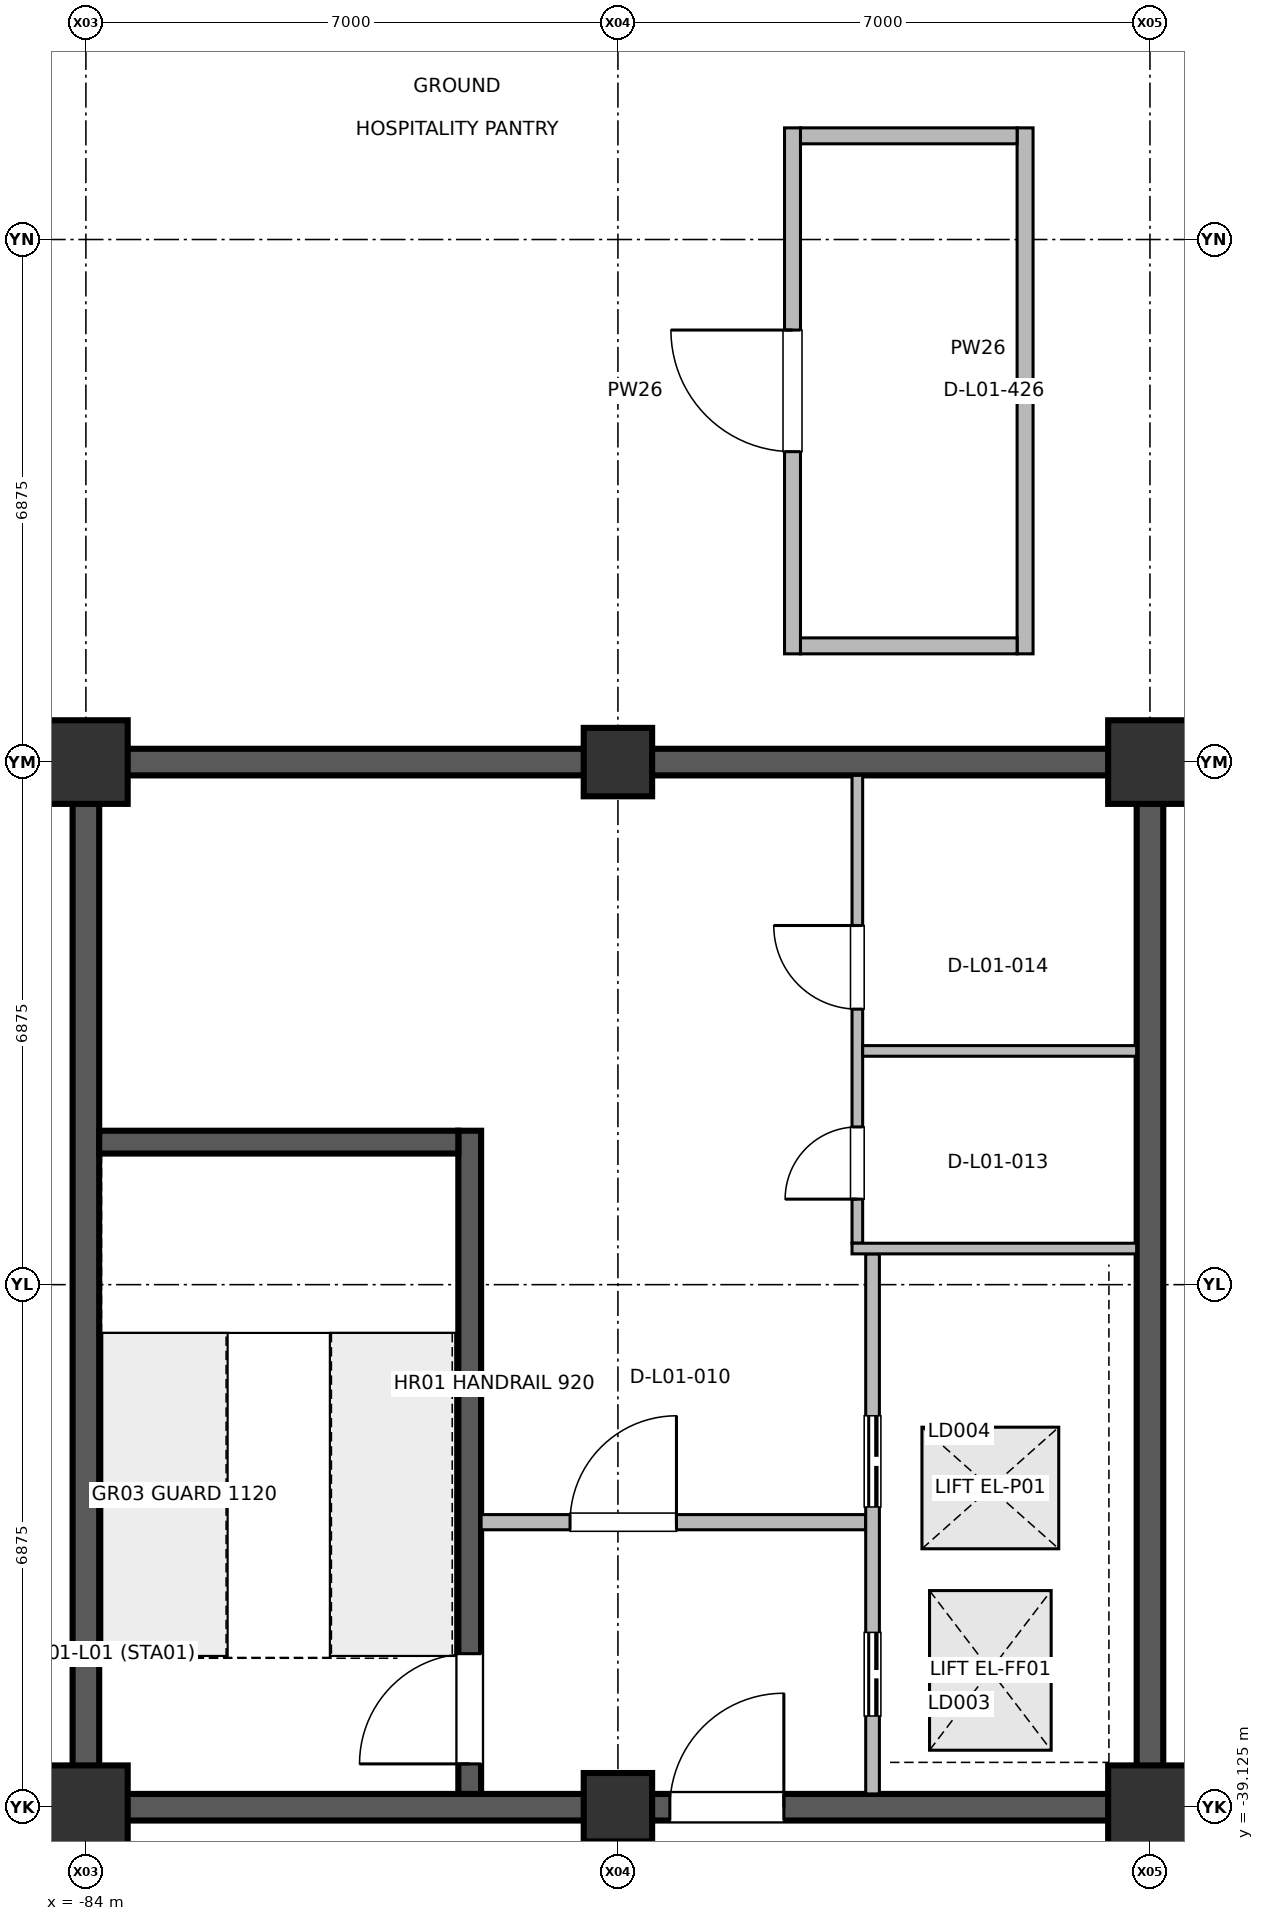
"""IFC4 building model, lengths in metres.
Left out: names, types, materials, properties, quantities, classifications, styles, units other than length and angle.
Written with IfcOpenShell. Run it as: python <this file> out.ifc"""

import sys

from ifc_helpers import new_model, si_unit, direction, frame, frame_2d, origin, origin_2d, place, context, subcontext, project, spatial, rectangle, extrude, element, fill, save


model = new_model("IFC4")
c1 = context("Model", 3, precision=1e-05, world=origin(), true_north=direction((0.0, 1.0)))
c2 = subcontext(c1, "Body", "Model", "MODEL_VIEW")
j1 = project(units=[si_unit("LENGTHUNIT", "METRE"), si_unit("PLANEANGLEUNIT", "RADIAN")], contexts=[c1])
p1 = place(None, origin())
s1 = spatial("IfcSite", under=j1, at=p1, CompositionType="ELEMENT")
p2 = place(p1, origin())
s2 = spatial("IfcBuilding", under=s1, at=p2, CompositionType="ELEMENT")
p3 = place(p2, origin())
s3 = spatial("IfcBuildingStorey", under=s2, at=p3, CompositionType="ELEMENT", Elevation=0.0)
for number, where, z_axis, x_axis in (
    (1, (-84.0, -39.125, 0.0), (0.0, 0.0, 1.0), (1.0, 0.0, 0.0)),
    (2, (-84.0, -25.375, 0.0), (0.0, 0.0, 1.0), (1.0, 0.0, 0.0)),
):
    element("IfcColumn", number, at=place(p3, frame(where, z_axis=z_axis, x_axis=x_axis)), inside=s3, PredefinedType="COLUMN", context=c2, shape_type="SweptSolid", body=[
        extrude(rectangle(XDim=1.1, YDim=1.1, at=origin_2d()), origin(), (0.0, 0.0, 1.0), 5.998),
    ])
for number, where, z_axis, x_axis in (
    (3, (-77.0, -39.125, 0.0), (0.0, 0.0, 1.0), (1.0, 0.0, 0.0)),
    (4, (-77.0, -25.375, 0.0), (0.0, 0.0, 1.0), (1.0, 0.0, 0.0)),
):
    element("IfcColumn", number, at=place(p3, frame(where, z_axis=z_axis, x_axis=x_axis)), inside=s3, PredefinedType="COLUMN", context=c2, shape_type="SweptSolid", body=[
        extrude(rectangle(XDim=0.9, YDim=0.9, at=origin_2d()), origin(), (0.0, 0.0, 1.0), 5.998),
    ])
for number, where, z_axis, x_axis in (
    (5, (-70.0, -39.125, 0.0), (0.0, 0.0, 1.0), (1.0, 0.0, 0.0)),
    (6, (-70.0, -25.375, 0.0), (0.0, 0.0, 1.0), (1.0, 0.0, 0.0)),
):
    element("IfcColumn", number, at=place(p3, frame(where, z_axis=z_axis, x_axis=x_axis)), inside=s3, PredefinedType="COLUMN", context=c2, shape_type="SweptSolid", body=[
        extrude(rectangle(XDim=1.1, YDim=1.1, at=origin_2d()), origin(), (0.0, 0.0, 1.0), 5.998),
    ])
for number, where, z_axis, x_axis in (
    (7, (-84.0, -38.95, 0.0), (0.0, 0.0, 1.0), (0.0, 1.0, 0.0)),
    (8, (-70.0, -38.95, 0.0), (0.0, 0.0, 1.0), (0.0, 1.0, 0.0)),
):
    element("IfcWall", number, at=place(p3, frame(where, z_axis=z_axis, x_axis=x_axis)), inside=s3, PredefinedType="SHEAR", context=c2, shape_type="SweptSolid", body=[
        extrude(rectangle(XDim=13.4, YDim=0.35, at=frame_2d((6.7, 0.0))), origin(), (0.0, 0.0, 1.0), 5.78),
    ])
p4 = place(p3, frame((-83.825, -39.125, 0.0), z_axis=(0.0, 0.0, 1.0), x_axis=(1.0, 0.0, 0.0)))
e9 = element("IfcWall", 9, at=p4, inside=s3, PredefinedType="SHEAR", context=c2, shape_type="SweptSolid", body=[
    extrude(rectangle(XDim=13.65, YDim=0.35, at=frame_2d((6.825, 0.0))), origin(), (0.0, 0.0, 1.0), 5.78),
])
p5 = place(p4, frame((7.508, 0.0, 0.0)))
e10 = element("IfcOpeningElement", 10, at=p5, cuts=e9, PredefinedType="OPENING", context=c2, shape_type="SweptSolid", body=[
    extrude(rectangle(XDim=1.5, YDim=2.2, at=frame_2d((0.75, 1.1))), frame((0.0, 0.185, 0.0), z_axis=(0.0, -1.0, 0.0), x_axis=(1.0, 0.0, 0.0)), (0.0, 0.0, 1.0), 0.37),
])
p6 = place(p3, frame((-83.825, -25.375, 0.0), z_axis=(0.0, 0.0, 1.0), x_axis=(1.0, 0.0, 0.0)))
e11 = element("IfcWall", 11, at=p6, inside=s3, PredefinedType="SHEAR", context=c2, shape_type="SweptSolid", body=[
    extrude(rectangle(XDim=13.65, YDim=0.35, at=frame_2d((6.825, 0.0))), origin(), (0.0, 0.0, 1.0), 5.78),
])
p7 = place(p3, frame((-78.95, -38.95, 0.0), z_axis=(0.0, 0.0, 1.0), x_axis=(0.0, 1.0, 0.0)))
e12 = element("IfcWall", 12, at=p7, inside=s3, PredefinedType="SHEAR", context=c2, shape_type="SweptSolid", body=[
    extrude(rectangle(XDim=8.725, YDim=0.3, at=frame_2d((4.362, 0.0))), origin(), (0.0, 0.0, 1.0), 5.78),
])
p8 = place(p7, frame((0.395, 0.0, 0.0)))
e13 = element("IfcOpeningElement", 13, at=p8, cuts=e12, PredefinedType="OPENING", context=c2, shape_type="SweptSolid", body=[
    extrude(rectangle(XDim=1.45, YDim=2.2, at=frame_2d((0.725, 1.1))), frame((0.0, 0.16, 0.0), z_axis=(0.0, -1.0, 0.0), x_axis=(1.0, 0.0, 0.0)), (0.0, 0.0, 1.0), 0.32),
])
p9 = place(p3, frame((-78.8, -35.375, 0.0), z_axis=(0.0, 0.0, 1.0), x_axis=(1.0, 0.0, 0.0)))
e14 = element("IfcWall", 14, at=p9, inside=s3, PredefinedType="PARTITIONING", context=c2, shape_type="SweptSolid", body=[
    extrude(rectangle(XDim=5.06, YDim=0.2, at=frame_2d((2.53, 0.0))), origin(), (0.0, 0.0, 1.0), 4.905),
])
p10 = place(p9, frame((1.17, 0.0, 0.0)))
e15 = element("IfcOpeningElement", 15, at=p10, cuts=e14, PredefinedType="OPENING", context=c2, shape_type="SweptSolid", body=[
    extrude(rectangle(XDim=1.4, YDim=2.2, at=frame_2d((0.7, 1.1))), frame((0.0, 0.11, 0.0), z_axis=(0.0, -1.0, 0.0), x_axis=(1.0, 0.0, 0.0)), (0.0, 0.0, 1.0), 0.22),
])
p11 = place(p3, frame((-73.65, -38.95, 0.0), z_axis=(0.0, 0.0, 1.0), x_axis=(0.0, 1.0, 0.0)))
e16 = element("IfcWall", 16, at=p11, inside=s3, PredefinedType="PARTITIONING", context=c2, shape_type="SweptSolid", body=[
    extrude(rectangle(XDim=7.105, YDim=0.18, at=frame_2d((3.552, 0.0))), origin(), (0.0, 0.0, 1.0), 5.02),
])
p12 = place(p11, frame((1.025, 0.0, 0.0)))
e17 = element("IfcOpeningElement", 17, at=p12, cuts=e16, PredefinedType="OPENING", context=c2, shape_type="SweptSolid", body=[
    extrude(rectangle(XDim=1.1, YDim=2.2, at=frame_2d((0.55, 1.1))), frame((0.0, 0.1, 0.0), z_axis=(0.0, -1.0, 0.0), x_axis=(1.0, 0.0, 0.0)), (0.0, 0.0, 1.0), 0.2),
])
p13 = place(p11, frame((3.775, 0.0, 0.0)))
e18 = element("IfcOpeningElement", 18, at=p13, cuts=e16, PredefinedType="OPENING", context=c2, shape_type="SweptSolid", body=[
    extrude(rectangle(XDim=1.2, YDim=2.25, at=frame_2d((0.6, 1.125))), frame((0.0, 0.1, 0.0), z_axis=(0.0, -1.0, 0.0), x_axis=(1.0, 0.0, 0.0)), (0.0, 0.0, 1.0), 0.2),
])
p14 = place(p3, frame((-73.85, -31.705, 0.0), z_axis=(0.0, 0.0, 1.0), x_axis=(0.0, 1.0, 0.0)))
e19 = element("IfcWall", 19, at=p14, inside=s3, PredefinedType="PARTITIONING", context=c2, shape_type="SweptSolid", body=[
    extrude(rectangle(XDim=6.155, YDim=0.14, at=frame_2d((3.078, 0.0))), origin(), (0.0, 0.0, 1.0), 5.02),
])
p15 = place(p14, frame((0.58, 0.0, 0.0)))
e20 = element("IfcOpeningElement", 20, at=p15, cuts=e19, PredefinedType="OPENING", context=c2, shape_type="SweptSolid", body=[
    extrude(rectangle(XDim=0.95, YDim=2.15, at=frame_2d((0.475, 1.075))), frame((0.0, 0.08, 0.0), z_axis=(0.0, -1.0, 0.0), x_axis=(1.0, 0.0, 0.0)), (0.0, 0.0, 1.0), 0.16),
])
p16 = place(p14, frame((3.08, 0.0, 0.0)))
e21 = element("IfcOpeningElement", 21, at=p16, cuts=e19, PredefinedType="OPENING", context=c2, shape_type="SweptSolid", body=[
    extrude(rectangle(XDim=1.1, YDim=2.15, at=frame_2d((0.55, 1.075))), frame((0.0, 0.08, 0.0), z_axis=(0.0, -1.0, 0.0), x_axis=(1.0, 0.0, 0.0)), (0.0, 0.0, 1.0), 0.16),
])
p17 = place(p3, frame((-74.703, -23.951, 0.0), z_axis=(0.0, 0.0, 1.0), x_axis=(0.0, 1.0, 0.0)))
e22 = element("IfcWall", 22, at=p17, inside=s3, PredefinedType="PARTITIONING", context=c2, shape_type="SweptSolid", body=[
    extrude(rectangle(XDim=6.92, YDim=0.21, at=frame_2d((3.46, 0.0))), origin(), (0.0, 0.0, 1.0), 5.02),
])
p18 = place(p17, frame((2.66, 0.0, 0.0)))
e23 = element("IfcOpeningElement", 23, at=p18, cuts=e22, PredefinedType="OPENING", context=c2, shape_type="SweptSolid", body=[
    extrude(rectangle(XDim=1.6, YDim=2.25, at=frame_2d((0.8, 1.125))), frame((0.0, 0.115, 0.0), z_axis=(0.0, -1.0, 0.0), x_axis=(1.0, 0.0, 0.0)), (0.0, 0.0, 1.0), 0.23),
])
p19 = place(p3, frame((-73.92, -31.775, 0.0), z_axis=(0.0, 0.0, 1.0), x_axis=(1.0, 0.0, 0.0)))
e24 = element("IfcWall", 24, at=p19, inside=s3, PredefinedType="PARTITIONING", context=c2, shape_type="SweptSolid", body=[
    extrude(rectangle(XDim=3.745, YDim=0.14, at=frame_2d((1.873, 0.0))), origin(), (0.0, 0.0, 1.0), 5.02),
])
p20 = place(p3, frame((-73.78, -29.175, 0.0), z_axis=(0.0, 0.0, 1.0), x_axis=(1.0, 0.0, 0.0)))
e25 = element("IfcWall", 25, at=p20, inside=s3, PredefinedType="PARTITIONING", context=c2, shape_type="SweptSolid", body=[
    extrude(rectangle(XDim=3.605, YDim=0.14, at=frame_2d((1.802, 0.0))), origin(), (0.0, 0.0, 1.0), 5.02),
])
p21 = place(p3, frame((-71.643, -23.951, 0.0), z_axis=(0.0, 0.0, 1.0), x_axis=(0.0, 1.0, 0.0)))
e26 = element("IfcWall", 26, at=p21, inside=s3, PredefinedType="PARTITIONING", context=c2, shape_type="SweptSolid", body=[
    extrude(rectangle(XDim=6.92, YDim=0.21, at=frame_2d((3.46, 0.0))), origin(), (0.0, 0.0, 1.0), 5.02),
])
for number, where, z_axis, x_axis in (
    (27, (-74.598, -23.846, 0.0), (0.0, 0.0, 1.0), (1.0, 0.0, 0.0)),
    (28, (-74.598, -17.136, 0.0), (0.0, 0.0, 1.0), (1.0, 0.0, 0.0)),
):
    element("IfcWall", number, at=place(p3, frame(where, z_axis=z_axis, x_axis=x_axis)), inside=s3, PredefinedType="PARTITIONING", context=c2, shape_type="SweptSolid", body=[
        extrude(rectangle(XDim=2.85, YDim=0.21, at=frame_2d((1.425, 0.0))), origin(), (0.0, 0.0, 1.0), 5.02),
    ])
p22 = place(p3, frame((-83.825, -30.375, 0.0), z_axis=(0.0, 0.0, 1.0), x_axis=(1.0, 0.0, 0.0)))
e29 = element("IfcWall", 29, at=p22, inside=s3, PredefinedType="SHEAR", context=c2, shape_type="SweptSolid", body=[
    extrude(rectangle(XDim=4.725, YDim=0.3, at=frame_2d((2.362, 0.0))), origin(), (0.0, 0.0, 1.0), 5.78),
])
p23 = place(p5, origin())
e30 = element("IfcDoor", 30, at=p23, inside=s3, OperationType="SINGLE_SWING_RIGHT", PredefinedType="DOOR", context=c2, shape_type="SweptSolid", body=[
    extrude(rectangle(XDim=1.5, YDim=2.2, at=frame_2d((0.75, 1.1))), frame((0.0, 0.025, 0.0), z_axis=(0.0, -1.0, 0.0), x_axis=(1.0, 0.0, 0.0)), (0.0, 0.0, 1.0), 0.05),
])
fill(e10, e30)
p24 = place(p8, origin())
e31 = element("IfcDoor", 31, at=p24, inside=s3, OperationType="SINGLE_SWING_LEFT", PredefinedType="DOOR", context=c2, shape_type="SweptSolid", body=[
    extrude(rectangle(XDim=1.45, YDim=2.2, at=frame_2d((0.725, 1.1))), frame((0.0, 0.025, 0.0), z_axis=(0.0, -1.0, 0.0), x_axis=(1.0, 0.0, 0.0)), (0.0, 0.0, 1.0), 0.05),
])
fill(e13, e31)
p25 = place(p10, origin())
e32 = element("IfcDoor", 32, at=p25, inside=s3, OperationType="SINGLE_SWING_RIGHT", PredefinedType="DOOR", context=c2, shape_type="SweptSolid", body=[
    extrude(rectangle(XDim=1.4, YDim=2.2, at=frame_2d((0.7, 1.1))), frame((0.0, 0.025, 0.0), z_axis=(0.0, -1.0, 0.0), x_axis=(1.0, 0.0, 0.0)), (0.0, 0.0, 1.0), 0.05),
])
fill(e15, e32)
p26 = place(p12, origin())
e33 = element("IfcDoor", 33, at=p26, inside=s3, OperationType="DOUBLE_DOOR_SLIDING", PredefinedType="DOOR", context=c2, shape_type="SweptSolid", body=[
    extrude(rectangle(XDim=1.1, YDim=2.2, at=frame_2d((0.55, 1.1))), frame((0.0, 0.025, 0.0), z_axis=(0.0, -1.0, 0.0), x_axis=(1.0, 0.0, 0.0)), (0.0, 0.0, 1.0), 0.05),
])
fill(e17, e33)
p27 = place(p13, origin())
e34 = element("IfcDoor", 34, at=p27, inside=s3, OperationType="DOUBLE_DOOR_SLIDING", PredefinedType="DOOR", context=c2, shape_type="SweptSolid", body=[
    extrude(rectangle(XDim=1.2, YDim=2.25, at=frame_2d((0.6, 1.125))), frame((0.0, 0.025, 0.0), z_axis=(0.0, -1.0, 0.0), x_axis=(1.0, 0.0, 0.0)), (0.0, 0.0, 1.0), 0.05),
])
fill(e18, e34)
p28 = place(p15, origin())
e35 = element("IfcDoor", 35, at=p28, inside=s3, OperationType="SINGLE_SWING_LEFT", PredefinedType="DOOR", context=c2, shape_type="SweptSolid", body=[
    extrude(rectangle(XDim=0.95, YDim=2.15, at=frame_2d((0.475, 1.075))), frame((0.0, 0.025, 0.0), z_axis=(0.0, -1.0, 0.0), x_axis=(1.0, 0.0, 0.0)), (0.0, 0.0, 1.0), 0.05),
])
fill(e20, e35)
p29 = place(p16, origin())
e36 = element("IfcDoor", 36, at=p29, inside=s3, OperationType="SINGLE_SWING_RIGHT", PredefinedType="DOOR", context=c2, shape_type="SweptSolid", body=[
    extrude(rectangle(XDim=1.1, YDim=2.15, at=frame_2d((0.55, 1.075))), frame((0.0, 0.025, 0.0), z_axis=(0.0, -1.0, 0.0), x_axis=(1.0, 0.0, 0.0)), (0.0, 0.0, 1.0), 0.05),
])
fill(e21, e36)
p30 = place(p18, origin())
e37 = element("IfcDoor", 37, at=p30, inside=s3, OperationType="SINGLE_SWING_RIGHT", PredefinedType="DOOR", context=c2, shape_type="SweptSolid", body=[
    extrude(rectangle(XDim=1.6, YDim=2.25, at=frame_2d((0.8, 1.125))), frame((0.0, 0.025, 0.0), z_axis=(0.0, -1.0, 0.0), x_axis=(1.0, 0.0, 0.0)), (0.0, 0.0, 1.0), 0.05),
])
fill(e23, e37)
save(model, sys.argv[1])
